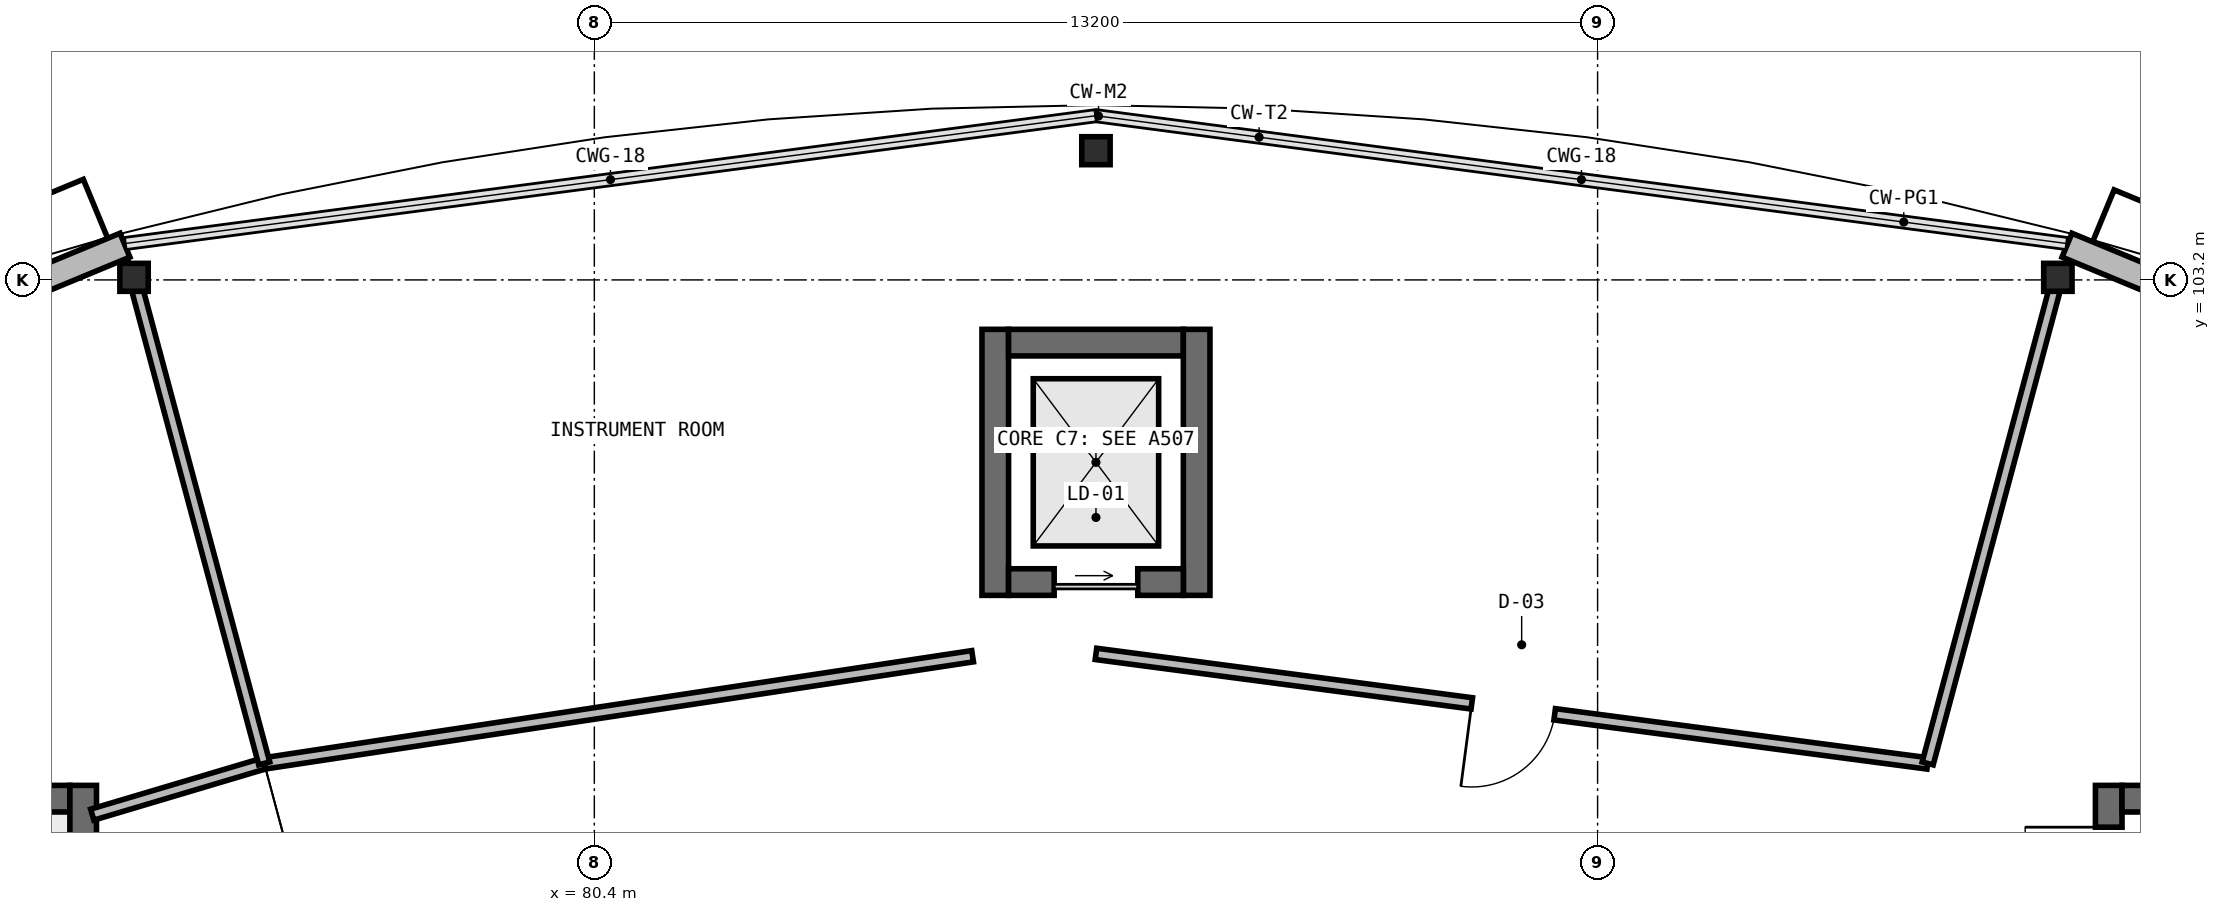
"""IFC4 building model, lengths in metres.
Left out: names, types, materials, properties, quantities, classifications, styles, units other than length and angle.
Written with IfcOpenShell. Run it as: python <this file> out.ifc"""

import sys

from ifc_helpers import new_model, si_unit, direction, frame, frame_2d, origin, origin_2d, place, context, subcontext, project, spatial, rectangle, i_section, extrude, element, fill, save


model = new_model("IFC4")
c1 = context("Model", 3, precision=1e-05, world=origin(), true_north=direction((0.0, 1.0)))
c2 = subcontext(c1, "Body", "Model", "MODEL_VIEW")
j1 = project(units=[si_unit("LENGTHUNIT", "METRE"), si_unit("PLANEANGLEUNIT", "RADIAN")], contexts=[c1])
p1 = place(None, origin())
s1 = spatial("IfcSite", under=j1, at=p1, CompositionType="ELEMENT")
p2 = place(p1, origin())
s2 = spatial("IfcBuilding", under=s1, at=p2, CompositionType="ELEMENT")
p3 = place(p2, origin())
s3 = spatial("IfcBuildingStorey", under=s2, at=p3, CompositionType="ELEMENT", Elevation=0.0)
p4 = place(p3, frame((100.325, 92.85, 0.0), z_axis=(0.0, 0.0, 1.0), x_axis=(0.0, 1.0, 0.0)))
e1 = element("IfcWall", 1, at=p4, inside=s3, PredefinedType="SHEAR", context=c2, shape_type="SweptSolid", body=[
    extrude(rectangle(XDim=3.7, YDim=0.35, at=frame_2d((1.85, 0.0))), origin(), (0.0, 0.0, 1.0), 5.25),
])
p5 = place(p4, frame((2.05, 0.0, 0.0)))
e2 = element("IfcOpeningElement", 2, at=p5, cuts=e1, PredefinedType="OPENING", context=c2, shape_type="SweptSolid", body=[
    extrude(rectangle(XDim=1.1, YDim=2.15, at=frame_2d((0.55, 1.075))), frame((0.0, 0.185, 0.0), z_axis=(0.0, -1.0, 0.0), x_axis=(1.0, 0.0, 0.0)), (0.0, 0.0, 1.0), 0.37),
])
for number, where, z_axis, x_axis in (
    (3, (100.5, 96.375, 0.0), (0.0, 0.0, 1.0), (1.0, 0.0, 0.0)),
    (4, (66.0, 96.375, 0.0), (0.0, 0.0, 1.0), (1.0, 0.0, 0.0)),
):
    element("IfcWall", number, at=place(p3, frame(where, z_axis=z_axis, x_axis=x_axis)), inside=s3, PredefinedType="SHEAR", context=c2, shape_type="SweptSolid", body=[
        extrude(rectangle(XDim=7.5, YDim=0.35, at=frame_2d((3.75, 0.0))), origin(), (0.0, 0.0, 1.0), 5.25),
    ])
p6 = place(p3, frame((73.675, 96.55, 0.0), z_axis=(0.0, 0.0, 1.0), x_axis=(0.0, -1.0, 0.0)))
e5 = element("IfcWall", 5, at=p6, inside=s3, PredefinedType="SHEAR", context=c2, shape_type="SweptSolid", body=[
    extrude(rectangle(XDim=3.7, YDim=0.35, at=frame_2d((1.85, 0.0))), origin(), (0.0, 0.0, 1.0), 5.25),
])
p7 = place(p3, frame((85.675, 99.05, 0.0), z_axis=(0.0, 0.0, 1.0), x_axis=(0.0, 1.0, 0.0)))
e6 = element("IfcWall", 6, at=p7, inside=s3, PredefinedType="SHEAR", context=c2, shape_type="SweptSolid", body=[
    extrude(rectangle(XDim=3.5, YDim=0.35, at=frame_2d((1.75, 0.0))), origin(), (0.0, 0.0, 1.0), 5.25),
])
p8 = place(p3, frame((85.85, 102.375, 0.0), z_axis=(0.0, 0.0, 1.0), x_axis=(1.0, 0.0, 0.0)))
e7 = element("IfcWall", 7, at=p8, inside=s3, PredefinedType="SHEAR", context=c2, shape_type="SweptSolid", body=[
    extrude(rectangle(XDim=2.3, YDim=0.35, at=frame_2d((1.15, 0.0))), origin(), (0.0, 0.0, 1.0), 5.25),
])
p9 = place(p3, frame((88.325, 102.55, 0.0), z_axis=(0.0, 0.0, 1.0), x_axis=(0.0, -1.0, 0.0)))
e8 = element("IfcWall", 8, at=p9, inside=s3, PredefinedType="SHEAR", context=c2, shape_type="SweptSolid", body=[
    extrude(rectangle(XDim=3.5, YDim=0.35, at=frame_2d((1.75, 0.0))), origin(), (0.0, 0.0, 1.0), 5.25),
])
p10 = place(p3, frame((88.15, 99.225, 0.0), z_axis=(0.0, 0.0, 1.0), x_axis=(-1.0, 0.0, 0.0)))
e9 = element("IfcWall", 9, at=p10, inside=s3, PredefinedType="SHEAR", context=c2, shape_type="SweptSolid", body=[
    extrude(rectangle(XDim=2.3, YDim=0.35, at=frame_2d((1.15, 0.0))), origin(), (0.0, 0.0, 1.0), 5.25),
])
p11 = place(p10, frame((0.6, 0.0, 0.0)))
e10 = element("IfcOpeningElement", 10, at=p11, cuts=e9, PredefinedType="OPENING", context=c2, shape_type="SweptSolid", body=[
    extrude(rectangle(XDim=1.1, YDim=2.15, at=frame_2d((0.55, 1.075))), frame((0.0, 0.185, 0.0), z_axis=(0.0, -1.0, 0.0), x_axis=(1.0, 0.0, 0.0)), (0.0, 0.0, 1.0), 0.37),
])
for number, where, z_axis, x_axis in (
    (11, (99.656, 103.234, 0.0), (0.0, 0.0, 1.0), (1.0, 0.0, 0.0)),
    (12, (87.0, 104.9, 0.0), (0.0, 0.0, 1.0), (1.0, 0.0, 0.0)),
    (13, (74.344, 103.234, 0.0), (0.0, 0.0, 1.0), (1.0, 0.0, 0.0)),
):
    element("IfcColumn", number, at=place(p3, frame(where, z_axis=z_axis, x_axis=x_axis)), inside=s3, PredefinedType="COLUMN", context=c2, shape_type="SweptSolid", body=[
        extrude(i_section(OverallWidth=0.373, OverallDepth=0.368, WebThickness=0.017, FlangeThickness=0.027, at=origin_2d()), origin(), (0.0, 0.0, 1.0), 5.25),
    ])
p12 = place(p3, frame((99.776, 103.657, 0.0), z_axis=(0.0, 0.0, 1.0), x_axis=(0.923868612896, -0.382709793584, 0.0)))
e14 = element("IfcWall", 14, at=p12, inside=s3, PredefinedType="SOLIDWALL", context=c2, shape_type="SweptSolid", body=[
    extrude(rectangle(XDim=12.869, YDim=0.34, at=frame_2d((6.435, 0.0))), origin(), (0.0, 0.0, 1.0), 4.433),
])
p13 = place(p12, frame((4.8, 0.0, 0.0)))
e15 = element("IfcOpeningElement", 15, at=p13, cuts=e14, PredefinedType="OPENING", context=c2, shape_type="SweptSolid", body=[
    extrude(rectangle(XDim=1.8, YDim=2.25, at=frame_2d((0.9, 1.125))), frame((0.0, 0.18, 0.0), z_axis=(0.0, -1.0, 0.0), x_axis=(1.0, 0.0, 0.0)), (0.0, 0.0, 1.0), 0.36),
])
p14 = place(p12, frame((8.412, 0.0, 0.95)))
e16 = element("IfcOpeningElement", 16, at=p14, cuts=e14, PredefinedType="OPENING", context=c2, shape_type="SweptSolid", body=[
    extrude(rectangle(XDim=2.48, YDim=1.97, at=frame_2d((1.24, 0.985))), frame((0.0, 0.18, 0.0), z_axis=(0.0, -1.0, 0.0), x_axis=(1.0, 0.0, 0.0)), (0.0, 0.0, 1.0), 0.36),
])
p15 = place(p3, frame((62.335, 98.732, 0.0), z_axis=(0.0, 0.0, 1.0), x_axis=(0.923868612896, 0.382709793584, 0.0)))
e17 = element("IfcWall", 17, at=p15, inside=s3, PredefinedType="SOLIDWALL", context=c2, shape_type="SweptSolid", body=[
    extrude(rectangle(XDim=12.869, YDim=0.34, at=frame_2d((6.435, 0.0))), origin(), (0.0, 0.0, 1.0), 4.433),
])
p16 = place(p15, frame((4.8, 0.0, 0.0)))
e18 = element("IfcOpeningElement", 18, at=p16, cuts=e17, PredefinedType="OPENING", context=c2, shape_type="SweptSolid", body=[
    extrude(rectangle(XDim=1.8, YDim=2.25, at=frame_2d((0.9, 1.125))), frame((0.0, 0.18, 0.0), z_axis=(0.0, -1.0, 0.0), x_axis=(1.0, 0.0, 0.0)), (0.0, 0.0, 1.0), 0.36),
])
p17 = place(p15, frame((2.197, 0.0, 0.95)))
e19 = element("IfcOpeningElement", 19, at=p17, cuts=e17, PredefinedType="OPENING", context=c2, shape_type="SweptSolid", body=[
    extrude(rectangle(XDim=2.04, YDim=1.65, at=frame_2d((1.02, 0.825))), frame((0.0, 0.18, 0.0), z_axis=(0.0, -1.0, 0.0), x_axis=(1.0, 0.0, 0.0)), (0.0, 0.0, 1.0), 0.36),
])
p18 = place(p15, frame((8.632, 0.0, 0.95)))
e20 = element("IfcOpeningElement", 20, at=p18, cuts=e17, PredefinedType="OPENING", context=c2, shape_type="SweptSolid", body=[
    extrude(rectangle(XDim=2.04, YDim=1.65, at=frame_2d((1.02, 0.825))), frame((0.0, 0.18, 0.0), z_axis=(0.0, -1.0, 0.0), x_axis=(1.0, 0.0, 0.0)), (0.0, 0.0, 1.0), 0.36),
])
p19 = place(p3, frame((97.943, 96.839, 0.0), z_axis=(0.0, 0.0, 1.0), x_axis=(-0.991442170204, 0.130546632054, 0.0)))
e21 = element("IfcWall", 21, at=p19, inside=s3, PredefinedType="PARTITIONING", context=c2, shape_type="SweptSolid", body=[
    extrude(rectangle(XDim=11.038, YDim=0.15, at=frame_2d((5.519, 0.0))), origin(), (0.0, 0.0, 1.0), 4.438),
])
p20 = place(p19, frame((4.95, 0.0, 0.0)))
e22 = element("IfcOpeningElement", 22, at=p20, cuts=e21, PredefinedType="OPENING", context=c2, shape_type="SweptSolid", body=[
    extrude(rectangle(XDim=1.1, YDim=2.2, at=frame_2d((0.55, 1.1))), frame((0.0, 0.085, 0.0), z_axis=(0.0, -1.0, 0.0), x_axis=(1.0, 0.0, 0.0)), (0.0, 0.0, 1.0), 0.17),
])
p21 = place(p3, frame((85.377, 98.249, 0.0), z_axis=(0.0, 0.0, 1.0), x_axis=(-0.988750352389, -0.149575200656, 0.0)))
e23 = element("IfcWall", 23, at=p21, inside=s3, PredefinedType="PARTITIONING", context=c2, shape_type="SweptSolid", body=[
    extrude(rectangle(XDim=9.426, YDim=0.15, at=frame_2d((4.713, 0.0))), origin(), (0.0, 0.0, 1.0), 4.438),
])
p22 = place(p3, frame((76.057, 96.839, 0.0), z_axis=(0.0, 0.0, 1.0), x_axis=(-0.95838508169, -0.285478607244, 0.0)))
e24 = element("IfcWall", 24, at=p22, inside=s3, PredefinedType="PARTITIONING", context=c2, shape_type="SweptSolid", body=[
    extrude(rectangle(XDim=2.361, YDim=0.15, at=frame_2d((1.181, 0.0))), origin(), (0.0, 0.0, 1.0), 4.438),
])
for number, where, z_axis, x_axis in (
    (25, (97.943, 96.839, 0.0), (0.0, 0.0, 1.0), (0.259, 0.966, 0.0)),
    (26, (76.057, 96.839, 0.0), (0.0, 0.0, 1.0), (-0.259, 0.966, 0.0)),
):
    element("IfcWall", number, at=place(p3, frame(where, z_axis=z_axis, x_axis=x_axis)), inside=s3, PredefinedType="PARTITIONING", context=c2, shape_type="SweptSolid", body=[
        extrude(rectangle(XDim=6.44, YDim=0.15, at=frame_2d((3.22, 0.0))), origin(), (0.0, 0.0, 1.0), 4.438),
    ])
p23 = place(p5, origin())
e27 = element("IfcDoor", 27, at=p23, inside=s3, OperationType="SINGLE_SWING_RIGHT", PredefinedType="DOOR", context=c2, shape_type="SweptSolid", body=[
    extrude(rectangle(XDim=1.1, YDim=2.15, at=frame_2d((0.55, 1.075))), frame((0.0, 0.025, 0.0), z_axis=(0.0, -1.0, 0.0), x_axis=(1.0, 0.0, 0.0)), (0.0, 0.0, 1.0), 0.05),
])
fill(e2, e27)
p24 = place(p11, origin())
e28 = element("IfcDoor", 28, at=p24, inside=s3, OperationType="SLIDING_TO_LEFT", PredefinedType="USERDEFINED", context=c2, shape_type="SweptSolid", body=[
    extrude(rectangle(XDim=1.1, YDim=2.15, at=frame_2d((0.55, 1.075))), frame((0.0, 0.025, 0.0), z_axis=(0.0, -1.0, 0.0), x_axis=(1.0, 0.0, 0.0)), (0.0, 0.0, 1.0), 0.05),
])
fill(e10, e28)
p25 = place(p20, origin())
e29 = element("IfcDoor", 29, at=p25, inside=s3, OperationType="SINGLE_SWING_RIGHT", PredefinedType="DOOR", context=c2, shape_type="SweptSolid", body=[
    extrude(rectangle(XDim=1.1, YDim=2.2, at=frame_2d((0.55, 1.1))), frame((0.0, 0.025, 0.0), z_axis=(0.0, -1.0, 0.0), x_axis=(1.0, 0.0, 0.0)), (0.0, 0.0, 1.0), 0.05),
])
fill(e22, e29)
save(model, sys.argv[1])
